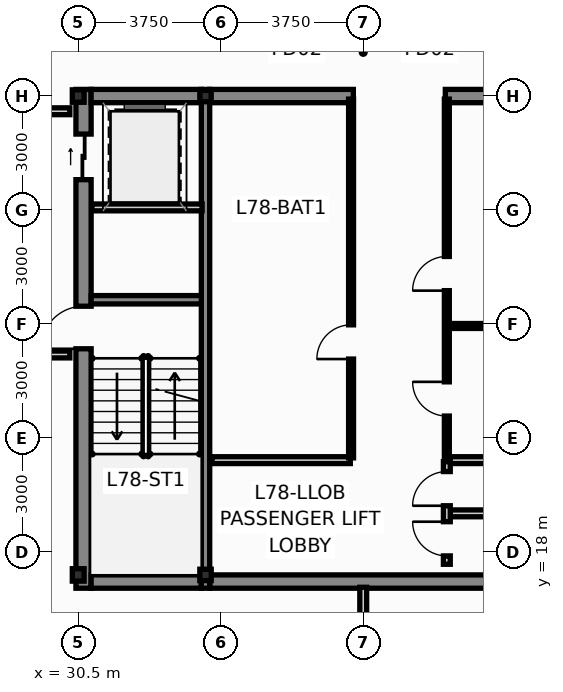
"""IFC4 building model, lengths in metres.
Left out: names, types, materials, properties, quantities, classifications, styles, units other than length and angle.
Written with IfcOpenShell. Run it as: python <this file> out.ifc"""

import sys

from ifc_helpers import new_model, si_unit, direction, frame, frame_2d, origin, origin_2d, place, context, subcontext, project, spatial, rectangle, hollow_rectangle, i_section, extrude, source, transform, mapped, element, fill, save


model = new_model("IFC4")
c1 = context("Model", 3, precision=1e-05, world=origin(), true_north=direction((0.0, 1.0)))
c2 = subcontext(c1, "Body", "Model", "MODEL_VIEW")
j1 = project(units=[si_unit("LENGTHUNIT", "METRE"), si_unit("PLANEANGLEUNIT", "RADIAN")], contexts=[c1])
p1 = place(None, origin())
s1 = spatial("IfcSite", under=j1, at=p1, CompositionType="ELEMENT")
p2 = place(p1, origin())
s2 = spatial("IfcBuilding", under=s1, at=p2, CompositionType="ELEMENT")
p3 = place(p2, frame((0.0, 0.0, 296.6)))
s3 = spatial("IfcBuildingStorey", under=s2, at=p3, CompositionType="ELEMENT", Elevation=296.6)
m1 = source(origin(), c2, "Body", "SweptSolid", [
    extrude(i_section(OverallWidth=0.311, OverallDepth=0.327, WebThickness=0.016, FlangeThickness=0.025, at=origin_2d()), origin(), (0.0, 0.0, 1.0), 3.4),
])
for number, where, z_axis, x_axis in (
    (1, (30.5, 17.4, 0.0), (0.0, 0.0, 1.0), (1.0, 0.0, 0.0)),
    (2, (30.5, 30.0, 0.0), (0.0, 0.0, 1.0), (1.0, 0.0, 0.0)),
):
    element("IfcColumn", number, at=place(p3, frame(where, z_axis=z_axis, x_axis=x_axis)), inside=s3, PredefinedType="COLUMN", context=c2, shape_type="MappedRepresentation", body=[
        mapped(m1, transform((0.0, 0.0, 0.0), scale=1.0)),
    ])
m2 = source(origin(), c2, "Body", "SweptSolid", [
    extrude(hollow_rectangle(XDim=0.3, YDim=0.3, WallThickness=0.012, at=origin_2d()), origin(), (0.0, 0.0, 1.0), 3.4),
])
for number, where, z_axis, x_axis in (
    (3, (33.85, 17.4, 0.0), (0.0, 0.0, 1.0), (1.0, 0.0, 0.0)),
    (4, (33.85, 30.0, 0.0), (0.0, 0.0, 1.0), (1.0, 0.0, 0.0)),
):
    element("IfcColumn", number, at=place(p3, frame(where, z_axis=z_axis, x_axis=x_axis)), inside=s3, PredefinedType="COLUMN", context=c2, shape_type="MappedRepresentation", body=[
        mapped(m2, transform((0.0, 0.0, 0.0), scale=1.0)),
    ])
p4 = place(p3, frame((30.64, 17.05, 0.0), z_axis=(0.0, 0.0, 1.0), x_axis=(0.0, 1.0, 0.0)))
e5 = element("IfcWall", 5, at=p4, inside=s3, PredefinedType="SHEAR", context=c2, shape_type="SweptSolid", body=[
    extrude(rectangle(XDim=13.125, YDim=0.4, at=frame_2d((6.562, 0.0))), origin(), (0.0, 0.0, 1.0), 3.4),
])
p5 = place(p4, frame((6.3, 0.0, 0.0)))
e6 = element("IfcOpeningElement", 6, at=p5, cuts=e5, PredefinedType="OPENING", context=c2, shape_type="SweptSolid", body=[
    extrude(rectangle(XDim=1.12, YDim=2.15, at=frame_2d((0.56, 1.075))), frame((0.0, 0.212, 0.0), z_axis=(0.0, -1.0, 0.0), x_axis=(1.0, 0.0, 0.0)), (0.0, 0.0, 1.0), 0.424),
])
p6 = place(p4, frame((10.75, 0.0, 0.0)))
e7 = element("IfcOpeningElement", 7, at=p6, cuts=e5, PredefinedType="OPENING", context=c2, shape_type="SweptSolid", body=[
    extrude(rectangle(XDim=1.2, YDim=2.2, at=frame_2d((0.6, 1.1))), frame((0.0, 0.212, 0.0), z_axis=(0.0, -1.0, 0.0), x_axis=(1.0, 0.0, 0.0)), (0.0, 0.0, 1.0), 0.424),
])
p7 = place(p3, frame((30.84, 17.225, 0.0), z_axis=(0.0, 0.0, 1.0), x_axis=(1.0, 0.0, 0.0)))
e8 = element("IfcWall", 8, at=p7, inside=s3, PredefinedType="SHEAR", context=c2, shape_type="SweptSolid", body=[
    extrude(rectangle(XDim=2.9, YDim=0.35, at=frame_2d((1.45, 0.0))), origin(), (0.0, 0.0, 1.0), 3.4),
])
p8 = place(p3, frame((33.96, 17.225, 0.0), z_axis=(0.0, 0.0, 1.0), x_axis=(1.0, 0.0, 0.0)))
e9 = element("IfcWall", 9, at=p8, inside=s3, PredefinedType="SHEAR", context=c2, shape_type="SweptSolid", body=[
    extrude(rectangle(XDim=8.08, YDim=0.35, at=frame_2d((4.04, 0.0))), origin(), (0.0, 0.0, 1.0), 3.4),
])
p9 = place(p3, frame((30.84, 30.0, 0.0), z_axis=(0.0, 0.0, 1.0), x_axis=(1.0, 0.0, 0.0)))
e10 = element("IfcWall", 10, at=p9, inside=s3, PredefinedType="SHEAR", context=c2, shape_type="SweptSolid", body=[
    extrude(rectangle(XDim=2.9, YDim=0.35, at=frame_2d((1.45, 0.0))), origin(), (0.0, 0.0, 1.0), 3.4),
])
p10 = place(p3, frame((33.96, 30.0, 0.0), z_axis=(0.0, 0.0, 1.0), x_axis=(1.0, 0.0, 0.0)))
e11 = element("IfcWall", 11, at=p10, inside=s3, PredefinedType="SHEAR", context=c2, shape_type="SweptSolid", body=[
    extrude(rectangle(XDim=3.78, YDim=0.35, at=frame_2d((1.89, 0.0))), origin(), (0.0, 0.0, 1.0), 3.4),
])
p11 = place(p3, frame((40.16, 30.0, 0.0), z_axis=(0.0, 0.0, 1.0), x_axis=(1.0, 0.0, 0.0)))
e12 = element("IfcWall", 12, at=p11, inside=s3, PredefinedType="SHEAR", context=c2, shape_type="SweptSolid", body=[
    extrude(rectangle(XDim=1.88, YDim=0.35, at=frame_2d((0.94, 0.0))), origin(), (0.0, 0.0, 1.0), 3.4),
])
p12 = place(p3, frame((33.85, 17.05, 0.0), z_axis=(0.0, 0.0, 1.0), x_axis=(0.0, 1.0, 0.0)))
e13 = element("IfcWall", 13, at=p12, inside=s3, PredefinedType="SHEAR", context=c2, shape_type="SweptSolid", body=[
    extrude(rectangle(XDim=13.125, YDim=0.22, at=frame_2d((6.562, 0.0))), origin(), (0.0, 0.0, 1.0), 3.4),
])
p13 = place(p3, frame((30.84, 24.64, 0.0), z_axis=(0.0, 0.0, 1.0), x_axis=(1.0, 0.0, 0.0)))
e14 = element("IfcWall", 14, at=p13, inside=s3, PredefinedType="SHEAR", context=c2, shape_type="SweptSolid", body=[
    extrude(rectangle(XDim=2.9, YDim=0.22, at=frame_2d((1.45, 0.0))), origin(), (0.0, 0.0, 1.0), 3.4),
])
for number, where, z_axis, x_axis in (
    (15, (27.52, 23.2, 0.0), (0.0, 0.0, 1.0), (1.0, 0.0, 0.0)),
    (16, (27.52, 29.6, 0.0), (0.0, 0.0, 1.0), (1.0, 0.0, 0.0)),
):
    element("IfcWall", number, at=place(p3, frame(where, z_axis=z_axis, x_axis=x_axis)), inside=s3, PredefinedType="PARTITIONING", context=c2, shape_type="SweptSolid", body=[
        extrude(rectangle(XDim=2.76, YDim=0.18, at=frame_2d((1.38, 0.0))), origin(), (0.0, 0.0, 1.0), 3.15),
    ])
p14 = place(p3, frame((30.86, 27.07, 0.0), z_axis=(0.0, 0.0, 1.0), x_axis=(1.0, 0.0, 0.0)))
e17 = element("IfcWall", 17, at=p14, inside=s3, PredefinedType="PARTITIONING", context=c2, shape_type="SweptSolid", body=[
    extrude(rectangle(XDim=2.9, YDim=0.18, at=frame_2d((1.45, 0.0))), origin(), (0.0, 0.0, 1.0), 3.15),
])
p15 = place(p3, frame((34.02, 20.42, 0.0), z_axis=(0.0, 0.0, 1.0), x_axis=(1.0, 0.0, 0.0)))
e18 = element("IfcWall", 18, at=p15, inside=s3, PredefinedType="PARTITIONING", context=c2, shape_type="SweptSolid", body=[
    extrude(rectangle(XDim=3.64, YDim=0.18, at=frame_2d((1.82, 0.0))), origin(), (0.0, 0.0, 1.0), 3.15),
])
p16 = place(p3, frame((40.22, 20.42, 0.0), z_axis=(0.0, 0.0, 1.0), x_axis=(1.0, 0.0, 0.0)))
e19 = element("IfcWall", 19, at=p16, inside=s3, PredefinedType="PARTITIONING", context=c2, shape_type="SweptSolid", body=[
    extrude(rectangle(XDim=1.76, YDim=0.18, at=frame_2d((0.88, 0.0))), origin(), (0.0, 0.0, 1.0), 3.15),
])
p17 = place(p3, frame((40.28, 23.95, 0.0), z_axis=(0.0, 0.0, 1.0), x_axis=(1.0, 0.0, 0.0)))
e20 = element("IfcWall", 20, at=p17, inside=s3, PredefinedType="PARTITIONING", context=c2, shape_type="SweptSolid", body=[
    extrude(rectangle(XDim=1.7, YDim=0.13, at=frame_2d((0.85, 0.0))), origin(), (0.0, 0.0, 1.0), 3.15),
])
p18 = place(p3, frame((37.68, 20.48, 0.0), z_axis=(0.0, 0.0, 1.0), x_axis=(0.0, 1.0, 0.0)))
e21 = element("IfcWall", 21, at=p18, inside=s3, PredefinedType="PARTITIONING", context=c2, shape_type="SweptSolid", body=[
    extrude(rectangle(XDim=9.44, YDim=0.13, at=frame_2d((4.72, 0.0))), origin(), (0.0, 0.0, 1.0), 3.15),
])
p19 = place(p18, frame((2.6, 0.0, 0.0)))
e22 = element("IfcOpeningElement", 22, at=p19, cuts=e21, PredefinedType="OPENING", context=c2, shape_type="SweptSolid", body=[
    extrude(rectangle(XDim=0.9, YDim=2.1, at=frame_2d((0.45, 1.05))), frame((0.0, 0.077, 0.0), z_axis=(0.0, -1.0, 0.0), x_axis=(1.0, 0.0, 0.0)), (0.0, 0.0, 1.0), 0.154),
])
p20 = place(p3, frame((40.2, 20.48, 0.0), z_axis=(0.0, 0.0, 1.0), x_axis=(0.0, 1.0, 0.0)))
e23 = element("IfcWall", 23, at=p20, inside=s3, PredefinedType="PARTITIONING", context=c2, shape_type="SweptSolid", body=[
    extrude(rectangle(XDim=9.44, YDim=0.13, at=frame_2d((4.72, 0.0))), origin(), (0.0, 0.0, 1.0), 3.15),
])
p21 = place(p20, frame((1.1, 0.0, 0.0)))
e24 = element("IfcOpeningElement", 24, at=p21, cuts=e23, PredefinedType="OPENING", context=c2, shape_type="SweptSolid", body=[
    extrude(rectangle(XDim=0.9, YDim=2.1, at=frame_2d((0.45, 1.05))), frame((0.0, 0.077, 0.0), z_axis=(0.0, -1.0, 0.0), x_axis=(1.0, 0.0, 0.0)), (0.0, 0.0, 1.0), 0.154),
])
p22 = place(p20, frame((4.4, 0.0, 0.0)))
e25 = element("IfcOpeningElement", 25, at=p22, cuts=e23, PredefinedType="OPENING", context=c2, shape_type="SweptSolid", body=[
    extrude(rectangle(XDim=0.9, YDim=2.1, at=frame_2d((0.45, 1.05))), frame((0.0, 0.077, 0.0), z_axis=(0.0, -1.0, 0.0), x_axis=(1.0, 0.0, 0.0)), (0.0, 0.0, 1.0), 0.154),
])
p23 = place(p3, frame((40.28, 19.02, 0.0), z_axis=(0.0, 0.0, 1.0), x_axis=(1.0, 0.0, 0.0)))
e26 = element("IfcWall", 26, at=p23, inside=s3, PredefinedType="PARTITIONING", context=c2, shape_type="SweptSolid", body=[
    extrude(rectangle(XDim=1.7, YDim=0.18, at=frame_2d((0.85, 0.0))), origin(), (0.0, 0.0, 1.0), 3.15),
])
p24 = place(p3, frame((40.2, 17.68, 0.0), z_axis=(0.0, 0.0, 1.0), x_axis=(0.0, 1.0, 0.0)))
e27 = element("IfcWall", 27, at=p24, inside=s3, PredefinedType="PARTITIONING", context=c2, shape_type="SweptSolid", body=[
    extrude(rectangle(XDim=2.7, YDim=0.18, at=frame_2d((1.35, 0.0))), origin(), (0.0, 0.0, 1.0), 3.15),
])
p25 = place(p24, frame((0.22, 0.0, 0.0)))
e28 = element("IfcOpeningElement", 28, at=p25, cuts=e27, PredefinedType="OPENING", context=c2, shape_type="SweptSolid", body=[
    extrude(rectangle(XDim=0.9, YDim=2.1, at=frame_2d((0.45, 1.05))), frame((0.0, 0.102, 0.0), z_axis=(0.0, -1.0, 0.0), x_axis=(1.0, 0.0, 0.0)), (0.0, 0.0, 1.0), 0.204),
])
p26 = place(p24, frame((1.54, 0.0, 0.0)))
e29 = element("IfcOpeningElement", 29, at=p26, cuts=e27, PredefinedType="OPENING", context=c2, shape_type="SweptSolid", body=[
    extrude(rectangle(XDim=0.9, YDim=2.1, at=frame_2d((0.45, 1.05))), frame((0.0, 0.102, 0.0), z_axis=(0.0, -1.0, 0.0), x_axis=(1.0, 0.0, 0.0)), (0.0, 0.0, 1.0), 0.204),
])
p27 = place(p3, frame((38.0, 9.0, 0.0), z_axis=(0.0, 0.0, 1.0), x_axis=(0.0, 1.0, 0.0)))
e30 = element("IfcWall", 30, at=p27, inside=s3, PredefinedType="PARTITIONING", context=c2, shape_type="SweptSolid", body=[
    extrude(rectangle(XDim=8.075, YDim=0.18, at=frame_2d((4.038, 0.0))), origin(), (0.0, 0.0, 1.0), 3.15),
])
p28 = place(p27, frame((3.512, 0.0, 0.0)))
e31 = element("IfcOpeningElement", 31, at=p28, cuts=e30, PredefinedType="OPENING", context=c2, shape_type="SweptSolid", body=[
    extrude(rectangle(XDim=1.05, YDim=2.15, at=frame_2d((0.525, 1.075))), frame((0.0, 0.102, 0.0), z_axis=(0.0, -1.0, 0.0), x_axis=(1.0, 0.0, 0.0)), (0.0, 0.0, 1.0), 0.204),
])
p29 = place(p5, origin())
e32 = element("IfcDoor", 32, at=p29, inside=s3, OperationType="SINGLE_SWING_LEFT", PredefinedType="DOOR", context=c2, shape_type="SweptSolid", body=[
    extrude(rectangle(XDim=1.12, YDim=2.15, at=frame_2d((0.56, 1.075))), frame((0.0, 0.025, 0.0), z_axis=(0.0, -1.0, 0.0), x_axis=(1.0, 0.0, 0.0)), (0.0, 0.0, 1.0), 0.05),
])
fill(e6, e32)
p30 = place(p6, origin())
e33 = element("IfcDoor", 33, at=p30, inside=s3, OperationType="SLIDING_TO_LEFT", PredefinedType="DOOR", context=c2, shape_type="SweptSolid", body=[
    extrude(rectangle(XDim=1.2, YDim=2.2, at=frame_2d((0.6, 1.1))), frame((0.0, 0.025, 0.0), z_axis=(0.0, -1.0, 0.0), x_axis=(1.0, 0.0, 0.0)), (0.0, 0.0, 1.0), 0.05),
])
fill(e7, e33)
p31 = place(p19, origin())
e34 = element("IfcDoor", 34, at=p31, inside=s3, OperationType="SINGLE_SWING_LEFT", PredefinedType="DOOR", context=c2, shape_type="SweptSolid", body=[
    extrude(rectangle(XDim=0.9, YDim=2.1, at=frame_2d((0.45, 1.05))), frame((0.0, 0.025, 0.0), z_axis=(0.0, -1.0, 0.0), x_axis=(1.0, 0.0, 0.0)), (0.0, 0.0, 1.0), 0.05),
])
fill(e22, e34)
p32 = place(p21, origin())
e35 = element("IfcDoor", 35, at=p32, inside=s3, OperationType="SINGLE_SWING_RIGHT", PredefinedType="DOOR", context=c2, shape_type="SweptSolid", body=[
    extrude(rectangle(XDim=0.9, YDim=2.1, at=frame_2d((0.45, 1.05))), frame((0.0, 0.025, 0.0), z_axis=(0.0, -1.0, 0.0), x_axis=(1.0, 0.0, 0.0)), (0.0, 0.0, 1.0), 0.05),
])
fill(e24, e35)
p33 = place(p22, origin())
e36 = element("IfcDoor", 36, at=p33, inside=s3, OperationType="SINGLE_SWING_LEFT", PredefinedType="DOOR", context=c2, shape_type="SweptSolid", body=[
    extrude(rectangle(XDim=0.9, YDim=2.1, at=frame_2d((0.45, 1.05))), frame((0.0, 0.025, 0.0), z_axis=(0.0, -1.0, 0.0), x_axis=(1.0, 0.0, 0.0)), (0.0, 0.0, 1.0), 0.05),
])
fill(e25, e36)
p34 = place(p25, origin())
e37 = element("IfcDoor", 37, at=p34, inside=s3, OperationType="SINGLE_SWING_RIGHT", PredefinedType="DOOR", context=c2, shape_type="SweptSolid", body=[
    extrude(rectangle(XDim=0.9, YDim=2.1, at=frame_2d((0.45, 1.05))), frame((0.0, 0.025, 0.0), z_axis=(0.0, -1.0, 0.0), x_axis=(1.0, 0.0, 0.0)), (0.0, 0.0, 1.0), 0.05),
])
fill(e28, e37)
p35 = place(p26, origin())
e38 = element("IfcDoor", 38, at=p35, inside=s3, OperationType="SINGLE_SWING_LEFT", PredefinedType="DOOR", context=c2, shape_type="SweptSolid", body=[
    extrude(rectangle(XDim=0.9, YDim=2.1, at=frame_2d((0.45, 1.05))), frame((0.0, 0.025, 0.0), z_axis=(0.0, -1.0, 0.0), x_axis=(1.0, 0.0, 0.0)), (0.0, 0.0, 1.0), 0.05),
])
fill(e29, e38)
save(model, sys.argv[1])
